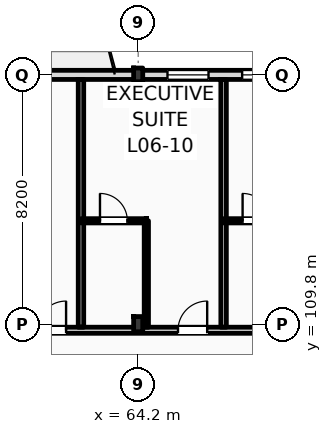
"""IFC4 building model, lengths in metres.
Left out: names, types, materials, properties, quantities, classifications, styles, units other than length and angle.
Written with IfcOpenShell. Run it as: python <this file> out.ifc"""

import sys

from ifc_helpers import new_model, si_unit, direction, frame, frame_2d, origin, origin_2d, place, context, subcontext, project, spatial, rectangle, i_section, extrude, element, fill, save


model = new_model("IFC4")
c1 = context("Model", 3, precision=1e-05, world=origin(), true_north=direction((0.0, 1.0)))
c2 = subcontext(c1, "Body", "Model", "MODEL_VIEW")
j1 = project(units=[si_unit("LENGTHUNIT", "METRE"), si_unit("PLANEANGLEUNIT", "RADIAN")], contexts=[c1])
p1 = place(None, origin())
s1 = spatial("IfcSite", under=j1, at=p1, CompositionType="ELEMENT")
p2 = place(p1, origin())
s2 = spatial("IfcBuilding", under=s1, at=p2, CompositionType="ELEMENT")
p3 = place(p2, frame((0.0, 0.0, 28.2)))
s3 = spatial("IfcBuildingStorey", under=s2, at=p3, CompositionType="ELEMENT", Elevation=28.2)
p4 = place(p3, frame((64.2, 109.8, 0.0), z_axis=(0.0, 0.0, 1.0), x_axis=(1.0, 0.0, 0.0)))
e1 = element("IfcColumn", 1, at=p4, inside=s3, PredefinedType="COLUMN", context=c2, shape_type="SweptSolid", body=[
    extrude(i_section(OverallWidth=0.3, OverallDepth=0.5, WebThickness=0.014, FlangeThickness=0.028, FilletRadius=0.027, at=origin_2d()), origin(), (0.0, 0.0, 1.0), 3.6),
])
p5 = place(p3, frame((64.2, 118.0, 0.0), z_axis=(0.0, 0.0, 1.0), x_axis=(1.0, 0.0, 0.0)))
e2 = element("IfcColumn", 2, at=p5, inside=s3, PredefinedType="COLUMN", context=c2, shape_type="SweptSolid", body=[
    extrude(i_section(OverallWidth=0.3, OverallDepth=0.45, WebThickness=0.014, FlangeThickness=0.026, FilletRadius=0.027, at=origin_2d()), origin(), (0.0, 0.0, 1.0), 3.6),
])
p6 = place(p3, frame((22.5, 118.0, 0.0), z_axis=(0.0, 0.0, 1.0), x_axis=(1.0, 0.0, 0.0)))
e3 = element("IfcWall", 3, at=p6, inside=s3, PredefinedType="STANDARD", context=c2, shape_type="SweptSolid", body=[
    extrude(rectangle(XDim=97.5, YDim=0.3, at=frame_2d((48.75, 0.0))), origin(), (0.0, 0.0, 1.0), 2.8),
])
p7 = place(p6, frame((0.91, 0.0, 0.9)))
e4 = element("IfcOpeningElement", 4, at=p7, cuts=e3, PredefinedType="OPENING", context=c2, shape_type="SweptSolid", body=[
    extrude(rectangle(XDim=0.9, YDim=1.72, at=frame_2d((0.45, 0.86))), frame((0.0, 0.16, 0.0), z_axis=(0.0, -1.0, 0.0), x_axis=(1.0, 0.0, 0.0)), (0.0, 0.0, 1.0), 0.32),
])
p8 = place(p6, frame((6.561, 0.0, 0.0)))
e5 = element("IfcOpeningElement", 5, at=p8, cuts=e3, PredefinedType="OPENING", context=c2, shape_type="SweptSolid", body=[
    extrude(rectangle(XDim=1.2, YDim=2.25, at=frame_2d((0.6, 1.125))), frame((0.0, 0.16, 0.0), z_axis=(0.0, -1.0, 0.0), x_axis=(1.0, 0.0, 0.0)), (0.0, 0.0, 1.0), 0.32),
])
p9 = place(p6, frame((11.477, 0.0, 0.9)))
e6 = element("IfcOpeningElement", 6, at=p9, cuts=e3, PredefinedType="OPENING", context=c2, shape_type="SweptSolid", body=[
    extrude(rectangle(XDim=1.1, YDim=1.5, at=frame_2d((0.55, 0.75))), frame((0.0, 0.16, 0.0), z_axis=(0.0, -1.0, 0.0), x_axis=(1.0, 0.0, 0.0)), (0.0, 0.0, 1.0), 0.32),
])
p10 = place(p6, frame((15.194, 0.0, 0.9)))
e7 = element("IfcOpeningElement", 7, at=p10, cuts=e3, PredefinedType="OPENING", context=c2, shape_type="SweptSolid", body=[
    extrude(rectangle(XDim=1.25, YDim=1.6, at=frame_2d((0.625, 0.8))), frame((0.0, 0.16, 0.0), z_axis=(0.0, -1.0, 0.0), x_axis=(1.0, 0.0, 0.0)), (0.0, 0.0, 1.0), 0.32),
])
p11 = place(p6, frame((19.509, 0.0, 0.9)))
e8 = element("IfcOpeningElement", 8, at=p11, cuts=e3, PredefinedType="OPENING", context=c2, shape_type="SweptSolid", body=[
    extrude(rectangle(XDim=1.4, YDim=1.7, at=frame_2d((0.7, 0.85))), frame((0.0, 0.16, 0.0), z_axis=(0.0, -1.0, 0.0), x_axis=(1.0, 0.0, 0.0)), (0.0, 0.0, 1.0), 0.32),
])
p12 = place(p6, frame((23.258, 0.0, 0.0)))
e9 = element("IfcOpeningElement", 9, at=p12, cuts=e3, PredefinedType="OPENING", context=c2, shape_type="SweptSolid", body=[
    extrude(rectangle(XDim=1.2, YDim=2.25, at=frame_2d((0.6, 1.125))), frame((0.0, 0.16, 0.0), z_axis=(0.0, -1.0, 0.0), x_axis=(1.0, 0.0, 0.0)), (0.0, 0.0, 1.0), 0.32),
])
p13 = place(p6, frame((28.115, 0.0, 0.9)))
e10 = element("IfcOpeningElement", 10, at=p13, cuts=e3, PredefinedType="OPENING", context=c2, shape_type="SweptSolid", body=[
    extrude(rectangle(XDim=1.75, YDim=1.72, at=frame_2d((0.875, 0.86))), frame((0.0, 0.16, 0.0), z_axis=(0.0, -1.0, 0.0), x_axis=(1.0, 0.0, 0.0)), (0.0, 0.0, 1.0), 0.32),
])
p14 = place(p6, frame((31.582, 0.0, 0.9)))
e11 = element("IfcOpeningElement", 11, at=p14, cuts=e3, PredefinedType="OPENING", context=c2, shape_type="SweptSolid", body=[
    extrude(rectangle(XDim=1.35, YDim=1.72, at=frame_2d((0.675, 0.86))), frame((0.0, 0.16, 0.0), z_axis=(0.0, -1.0, 0.0), x_axis=(1.0, 0.0, 0.0)), (0.0, 0.0, 1.0), 0.32),
])
p15 = place(p6, frame((37.379, 0.0, 0.0)))
e12 = element("IfcOpeningElement", 12, at=p15, cuts=e3, PredefinedType="OPENING", context=c2, shape_type="SweptSolid", body=[
    extrude(rectangle(XDim=1.2, YDim=2.25, at=frame_2d((0.6, 1.125))), frame((0.0, 0.16, 0.0), z_axis=(0.0, -1.0, 0.0), x_axis=(1.0, 0.0, 0.0)), (0.0, 0.0, 1.0), 0.32),
])
p16 = place(p6, frame((42.663, 0.0, 0.9)))
e13 = element("IfcOpeningElement", 13, at=p16, cuts=e3, PredefinedType="OPENING", context=c2, shape_type="SweptSolid", body=[
    extrude(rectangle(XDim=1.35, YDim=1.72, at=frame_2d((0.675, 0.86))), frame((0.0, 0.16, 0.0), z_axis=(0.0, -1.0, 0.0), x_axis=(1.0, 0.0, 0.0)), (0.0, 0.0, 1.0), 0.32),
])
p17 = place(p6, frame((45.119, 0.0, 0.9)))
e14 = element("IfcOpeningElement", 14, at=p17, cuts=e3, PredefinedType="OPENING", context=c2, shape_type="SweptSolid", body=[
    extrude(rectangle(XDim=2.871, YDim=1.72, at=frame_2d((1.436, 0.86))), frame((0.0, 0.16, 0.0), z_axis=(0.0, -1.0, 0.0), x_axis=(1.0, 0.0, 0.0)), (0.0, 0.0, 1.0), 0.32),
])
p18 = place(p6, frame((50.41, 0.0, 0.9)))
e15 = element("IfcOpeningElement", 15, at=p18, cuts=e3, PredefinedType="OPENING", context=c2, shape_type="SweptSolid", body=[
    extrude(rectangle(XDim=1.8, YDim=1.72, at=frame_2d((0.9, 0.86))), frame((0.0, 0.16, 0.0), z_axis=(0.0, -1.0, 0.0), x_axis=(1.0, 0.0, 0.0)), (0.0, 0.0, 1.0), 0.32),
])
p19 = place(p6, frame((54.375, 0.0, 0.0)))
e16 = element("IfcOpeningElement", 16, at=p19, cuts=e3, PredefinedType="OPENING", context=c2, shape_type="SweptSolid", body=[
    extrude(rectangle(XDim=1.2, YDim=2.25, at=frame_2d((0.6, 1.125))), frame((0.0, 0.16, 0.0), z_axis=(0.0, -1.0, 0.0), x_axis=(1.0, 0.0, 0.0)), (0.0, 0.0, 1.0), 0.32),
])
p20 = place(p6, frame((59.052, 0.0, 0.9)))
e17 = element("IfcOpeningElement", 17, at=p20, cuts=e3, PredefinedType="OPENING", context=c2, shape_type="SweptSolid", body=[
    extrude(rectangle(XDim=1.35, YDim=1.72, at=frame_2d((0.675, 0.86))), frame((0.0, 0.16, 0.0), z_axis=(0.0, -1.0, 0.0), x_axis=(1.0, 0.0, 0.0)), (0.0, 0.0, 1.0), 0.32),
])
p21 = place(p6, frame((62.768, 0.0, 0.9)))
e18 = element("IfcOpeningElement", 18, at=p21, cuts=e3, PredefinedType="OPENING", context=c2, shape_type="SweptSolid", body=[
    extrude(rectangle(XDim=1.5, YDim=1.72, at=frame_2d((0.75, 0.86))), frame((0.0, 0.16, 0.0), z_axis=(0.0, -1.0, 0.0), x_axis=(1.0, 0.0, 0.0)), (0.0, 0.0, 1.0), 0.32),
])
p22 = place(p6, frame((68.498, 0.0, 0.0)))
e19 = element("IfcOpeningElement", 19, at=p22, cuts=e3, PredefinedType="OPENING", context=c2, shape_type="SweptSolid", body=[
    extrude(rectangle(XDim=1.2, YDim=2.25, at=frame_2d((0.6, 1.125))), frame((0.0, 0.16, 0.0), z_axis=(0.0, -1.0, 0.0), x_axis=(1.0, 0.0, 0.0)), (0.0, 0.0, 1.0), 0.32),
])
p23 = place(p6, frame((71.265, 0.0, 0.9)))
e20 = element("IfcOpeningElement", 20, at=p23, cuts=e3, PredefinedType="OPENING", context=c2, shape_type="SweptSolid", body=[
    extrude(rectangle(XDim=0.9, YDim=1.72, at=frame_2d((0.45, 0.86))), frame((0.0, 0.16, 0.0), z_axis=(0.0, -1.0, 0.0), x_axis=(1.0, 0.0, 0.0)), (0.0, 0.0, 1.0), 0.32),
])
p24 = place(p6, frame((76.316, 0.0, 0.9)))
e21 = element("IfcOpeningElement", 21, at=p24, cuts=e3, PredefinedType="OPENING", context=c2, shape_type="SweptSolid", body=[
    extrude(rectangle(XDim=1.95, YDim=1.72, at=frame_2d((0.975, 0.86))), frame((0.0, 0.16, 0.0), z_axis=(0.0, -1.0, 0.0), x_axis=(1.0, 0.0, 0.0)), (0.0, 0.0, 1.0), 0.32),
])
p25 = place(p6, frame((81.632, 0.0, 0.9)))
e22 = element("IfcOpeningElement", 22, at=p25, cuts=e3, PredefinedType="OPENING", context=c2, shape_type="SweptSolid", body=[
    extrude(rectangle(XDim=1.35, YDim=1.72, at=frame_2d((0.675, 0.86))), frame((0.0, 0.16, 0.0), z_axis=(0.0, -1.0, 0.0), x_axis=(1.0, 0.0, 0.0)), (0.0, 0.0, 1.0), 0.32),
])
p26 = place(p6, frame((84.948, 0.0, 0.9)))
e23 = element("IfcOpeningElement", 23, at=p26, cuts=e3, PredefinedType="OPENING", context=c2, shape_type="SweptSolid", body=[
    extrude(rectangle(XDim=2.25, YDim=1.72, at=frame_2d((1.125, 0.86))), frame((0.0, 0.16, 0.0), z_axis=(0.0, -1.0, 0.0), x_axis=(1.0, 0.0, 0.0)), (0.0, 0.0, 1.0), 0.32),
])
p27 = place(p6, frame((90.063, 0.0, 0.9)))
e24 = element("IfcOpeningElement", 24, at=p27, cuts=e3, PredefinedType="OPENING", context=c2, shape_type="SweptSolid", body=[
    extrude(rectangle(XDim=1.8, YDim=1.72, at=frame_2d((0.9, 0.86))), frame((0.0, 0.16, 0.0), z_axis=(0.0, -1.0, 0.0), x_axis=(1.0, 0.0, 0.0)), (0.0, 0.0, 1.0), 0.32),
])
p28 = place(p6, frame((93.529, 0.0, 0.9)))
e25 = element("IfcOpeningElement", 25, at=p28, cuts=e3, PredefinedType="OPENING", context=c2, shape_type="SweptSolid", body=[
    extrude(rectangle(XDim=2.55, YDim=1.72, at=frame_2d((1.275, 0.86))), frame((0.0, 0.16, 0.0), z_axis=(0.0, -1.0, 0.0), x_axis=(1.0, 0.0, 0.0)), (0.0, 0.0, 1.0), 0.32),
])
p29 = place(p3, frame((10.65, 109.6, 0.0), z_axis=(0.0, 0.0, 1.0), x_axis=(1.0, 0.0, 0.0)))
e26 = element("IfcWall", 26, at=p29, inside=s3, PredefinedType="PARTITIONING", context=c2, shape_type="SweptSolid", body=[
    extrude(rectangle(XDim=109.21, YDim=0.2, at=frame_2d((54.605, 0.0))), origin(), (0.0, 0.0, 1.0), 2.8),
])
p30 = place(p29, frame((12.611, 0.0, 0.0)))
e27 = element("IfcOpeningElement", 27, at=p30, cuts=e26, PredefinedType="OPENING", context=c2, shape_type="SweptSolid", body=[
    extrude(rectangle(XDim=1.02, YDim=2.2, at=frame_2d((0.51, 1.1))), frame((0.0, 0.11, 0.0), z_axis=(0.0, -1.0, 0.0), x_axis=(1.0, 0.0, 0.0)), (0.0, 0.0, 1.0), 0.22),
])
p31 = place(p29, frame((19.451, 0.0, 0.0)))
e28 = element("IfcOpeningElement", 28, at=p31, cuts=e26, PredefinedType="OPENING", context=c2, shape_type="SweptSolid", body=[
    extrude(rectangle(XDim=1.02, YDim=2.2, at=frame_2d((0.51, 1.1))), frame((0.0, 0.11, 0.0), z_axis=(0.0, -1.0, 0.0), x_axis=(1.0, 0.0, 0.0)), (0.0, 0.0, 1.0), 0.22),
])
p32 = place(p29, frame((23.842, 0.0, 0.0)))
e29 = element("IfcOpeningElement", 29, at=p32, cuts=e26, PredefinedType="OPENING", context=c2, shape_type="SweptSolid", body=[
    extrude(rectangle(XDim=1.02, YDim=2.2, at=frame_2d((0.51, 1.1))), frame((0.0, 0.11, 0.0), z_axis=(0.0, -1.0, 0.0), x_axis=(1.0, 0.0, 0.0)), (0.0, 0.0, 1.0), 0.22),
])
p33 = place(p29, frame((26.084, 0.0, 0.0)))
e30 = element("IfcOpeningElement", 30, at=p33, cuts=e26, PredefinedType="OPENING", context=c2, shape_type="SweptSolid", body=[
    extrude(rectangle(XDim=1.02, YDim=2.2, at=frame_2d((0.51, 1.1))), frame((0.0, 0.11, 0.0), z_axis=(0.0, -1.0, 0.0), x_axis=(1.0, 0.0, 0.0)), (0.0, 0.0, 1.0), 0.22),
])
p34 = place(p29, frame((32.655, 0.0, 0.0)))
e31 = element("IfcOpeningElement", 31, at=p34, cuts=e26, PredefinedType="OPENING", context=c2, shape_type="SweptSolid", body=[
    extrude(rectangle(XDim=0.96, YDim=2.2, at=frame_2d((0.48, 1.1))), frame((0.0, 0.11, 0.0), z_axis=(0.0, -1.0, 0.0), x_axis=(1.0, 0.0, 0.0)), (0.0, 0.0, 1.0), 0.22),
])
p35 = place(p29, frame((34.895, 0.0, 0.0)))
e32 = element("IfcOpeningElement", 32, at=p35, cuts=e26, PredefinedType="OPENING", context=c2, shape_type="SweptSolid", body=[
    extrude(rectangle(XDim=0.96, YDim=2.2, at=frame_2d((0.48, 1.1))), frame((0.0, 0.11, 0.0), z_axis=(0.0, -1.0, 0.0), x_axis=(1.0, 0.0, 0.0)), (0.0, 0.0, 1.0), 0.22),
])
p36 = place(p29, frame((41.436, 0.0, 0.0)))
e33 = element("IfcOpeningElement", 33, at=p36, cuts=e26, PredefinedType="OPENING", context=c2, shape_type="SweptSolid", body=[
    extrude(rectangle(XDim=0.96, YDim=2.2, at=frame_2d((0.48, 1.1))), frame((0.0, 0.11, 0.0), z_axis=(0.0, -1.0, 0.0), x_axis=(1.0, 0.0, 0.0)), (0.0, 0.0, 1.0), 0.22),
])
p37 = place(p29, frame((43.427, 0.0, 0.0)))
e34 = element("IfcOpeningElement", 34, at=p37, cuts=e26, PredefinedType="OPENING", context=c2, shape_type="SweptSolid", body=[
    extrude(rectangle(XDim=0.96, YDim=2.2, at=frame_2d((0.48, 1.1))), frame((0.0, 0.11, 0.0), z_axis=(0.0, -1.0, 0.0), x_axis=(1.0, 0.0, 0.0)), (0.0, 0.0, 1.0), 0.22),
])
p38 = place(p29, frame((50.218, 0.0, 0.0)))
e35 = element("IfcOpeningElement", 35, at=p38, cuts=e26, PredefinedType="OPENING", context=c2, shape_type="SweptSolid", body=[
    extrude(rectangle(XDim=0.96, YDim=2.2, at=frame_2d((0.48, 1.1))), frame((0.0, 0.11, 0.0), z_axis=(0.0, -1.0, 0.0), x_axis=(1.0, 0.0, 0.0)), (0.0, 0.0, 1.0), 0.22),
])
p39 = place(p29, frame((54.859, 0.0, 0.0)))
e36 = element("IfcOpeningElement", 36, at=p39, cuts=e26, PredefinedType="OPENING", context=c2, shape_type="SweptSolid", body=[
    extrude(rectangle(XDim=0.96, YDim=2.2, at=frame_2d((0.48, 1.1))), frame((0.0, 0.11, 0.0), z_axis=(0.0, -1.0, 0.0), x_axis=(1.0, 0.0, 0.0)), (0.0, 0.0, 1.0), 0.22),
])
p40 = place(p29, frame((59.0, 0.0, 0.0)))
e37 = element("IfcOpeningElement", 37, at=p40, cuts=e26, PredefinedType="OPENING", context=c2, shape_type="SweptSolid", body=[
    extrude(rectangle(XDim=0.96, YDim=2.2, at=frame_2d((0.48, 1.1))), frame((0.0, 0.11, 0.0), z_axis=(0.0, -1.0, 0.0), x_axis=(1.0, 0.0, 0.0)), (0.0, 0.0, 1.0), 0.22),
])
p41 = place(p29, frame((63.39, 0.0, 0.0)))
e38 = element("IfcOpeningElement", 38, at=p41, cuts=e26, PredefinedType="OPENING", context=c2, shape_type="SweptSolid", body=[
    extrude(rectangle(XDim=0.96, YDim=2.2, at=frame_2d((0.48, 1.1))), frame((0.0, 0.11, 0.0), z_axis=(0.0, -1.0, 0.0), x_axis=(1.0, 0.0, 0.0)), (0.0, 0.0, 1.0), 0.22),
])
p42 = place(p29, frame((65.631, 0.0, 0.0)))
e39 = element("IfcOpeningElement", 39, at=p42, cuts=e26, PredefinedType="OPENING", context=c2, shape_type="SweptSolid", body=[
    extrude(rectangle(XDim=0.96, YDim=2.2, at=frame_2d((0.48, 1.1))), frame((0.0, 0.11, 0.0), z_axis=(0.0, -1.0, 0.0), x_axis=(1.0, 0.0, 0.0)), (0.0, 0.0, 1.0), 0.22),
])
p43 = place(p29, frame((72.172, 0.0, 0.0)))
e40 = element("IfcOpeningElement", 40, at=p43, cuts=e26, PredefinedType="OPENING", context=c2, shape_type="SweptSolid", body=[
    extrude(rectangle(XDim=0.96, YDim=2.2, at=frame_2d((0.48, 1.1))), frame((0.0, 0.11, 0.0), z_axis=(0.0, -1.0, 0.0), x_axis=(1.0, 0.0, 0.0)), (0.0, 0.0, 1.0), 0.22),
])
p44 = place(p29, frame((74.413, 0.0, 0.0)))
e41 = element("IfcOpeningElement", 41, at=p44, cuts=e26, PredefinedType="OPENING", context=c2, shape_type="SweptSolid", body=[
    extrude(rectangle(XDim=0.96, YDim=2.2, at=frame_2d((0.48, 1.1))), frame((0.0, 0.11, 0.0), z_axis=(0.0, -1.0, 0.0), x_axis=(1.0, 0.0, 0.0)), (0.0, 0.0, 1.0), 0.22),
])
p45 = place(p29, frame((80.954, 0.0, 0.0)))
e42 = element("IfcOpeningElement", 42, at=p45, cuts=e26, PredefinedType="OPENING", context=c2, shape_type="SweptSolid", body=[
    extrude(rectangle(XDim=0.96, YDim=2.2, at=frame_2d((0.48, 1.1))), frame((0.0, 0.11, 0.0), z_axis=(0.0, -1.0, 0.0), x_axis=(1.0, 0.0, 0.0)), (0.0, 0.0, 1.0), 0.22),
])
p46 = place(p29, frame((83.195, 0.0, 0.0)))
e43 = element("IfcOpeningElement", 43, at=p46, cuts=e26, PredefinedType="OPENING", context=c2, shape_type="SweptSolid", body=[
    extrude(rectangle(XDim=0.96, YDim=2.2, at=frame_2d((0.48, 1.1))), frame((0.0, 0.11, 0.0), z_axis=(0.0, -1.0, 0.0), x_axis=(1.0, 0.0, 0.0)), (0.0, 0.0, 1.0), 0.22),
])
p47 = place(p29, frame((89.735, 0.0, 0.0)))
e44 = element("IfcOpeningElement", 44, at=p47, cuts=e26, PredefinedType="OPENING", context=c2, shape_type="SweptSolid", body=[
    extrude(rectangle(XDim=0.96, YDim=2.2, at=frame_2d((0.48, 1.1))), frame((0.0, 0.11, 0.0), z_axis=(0.0, -1.0, 0.0), x_axis=(1.0, 0.0, 0.0)), (0.0, 0.0, 1.0), 0.22),
])
p48 = place(p29, frame((94.126, 0.0, 0.0)))
e45 = element("IfcOpeningElement", 45, at=p48, cuts=e26, PredefinedType="OPENING", context=c2, shape_type="SweptSolid", body=[
    extrude(rectangle(XDim=0.96, YDim=2.2, at=frame_2d((0.48, 1.1))), frame((0.0, 0.11, 0.0), z_axis=(0.0, -1.0, 0.0), x_axis=(1.0, 0.0, 0.0)), (0.0, 0.0, 1.0), 0.22),
])
p49 = place(p29, frame((98.517, 0.0, 0.0)))
e46 = element("IfcOpeningElement", 46, at=p49, cuts=e26, PredefinedType="OPENING", context=c2, shape_type="SweptSolid", body=[
    extrude(rectangle(XDim=0.96, YDim=2.2, at=frame_2d((0.48, 1.1))), frame((0.0, 0.11, 0.0), z_axis=(0.0, -1.0, 0.0), x_axis=(1.0, 0.0, 0.0)), (0.0, 0.0, 1.0), 0.22),
])
p50 = place(p29, frame((102.908, 0.0, 0.0)))
e47 = element("IfcOpeningElement", 47, at=p50, cuts=e26, PredefinedType="OPENING", context=c2, shape_type="SweptSolid", body=[
    extrude(rectangle(XDim=0.96, YDim=2.2, at=frame_2d((0.48, 1.1))), frame((0.0, 0.11, 0.0), z_axis=(0.0, -1.0, 0.0), x_axis=(1.0, 0.0, 0.0)), (0.0, 0.0, 1.0), 0.22),
])
p51 = place(p29, frame((105.099, 0.0, 0.0)))
e48 = element("IfcOpeningElement", 48, at=p51, cuts=e26, PredefinedType="OPENING", context=c2, shape_type="SweptSolid", body=[
    extrude(rectangle(XDim=0.96, YDim=2.2, at=frame_2d((0.48, 1.1))), frame((0.0, 0.11, 0.0), z_axis=(0.0, -1.0, 0.0), x_axis=(1.0, 0.0, 0.0)), (0.0, 0.0, 1.0), 0.22),
])
p52 = place(p29, frame((2.716, 0.0, 0.0)))
e49 = element("IfcOpeningElement", 49, at=p52, cuts=e26, PredefinedType="OPENING", context=c2, shape_type="SweptSolid", body=[
    extrude(rectangle(XDim=1.35, YDim=2.25, at=frame_2d((0.675, 1.125))), frame((0.0, 0.11, 0.0), z_axis=(0.0, -1.0, 0.0), x_axis=(1.0, 0.0, 0.0)), (0.0, 0.0, 1.0), 0.22),
])
p53 = place(p29, frame((6.65, 0.0, 0.0)))
e50 = element("IfcOpeningElement", 50, at=p53, cuts=e26, PredefinedType="OPENING", context=c2, shape_type="SweptSolid", body=[
    extrude(rectangle(XDim=1.35, YDim=2.25, at=frame_2d((0.675, 1.125))), frame((0.0, 0.11, 0.0), z_axis=(0.0, -1.0, 0.0), x_axis=(1.0, 0.0, 0.0)), (0.0, 0.0, 1.0), 0.22),
])
p54 = place(p29, frame((10.583, 0.0, 0.0)))
e51 = element("IfcOpeningElement", 51, at=p54, cuts=e26, PredefinedType="OPENING", context=c2, shape_type="SweptSolid", body=[
    extrude(rectangle(XDim=1.35, YDim=2.25, at=frame_2d((0.675, 1.125))), frame((0.0, 0.11, 0.0), z_axis=(0.0, -1.0, 0.0), x_axis=(1.0, 0.0, 0.0)), (0.0, 0.0, 1.0), 0.22),
])
p55 = place(p3, frame((62.318, 109.7, 0.0), z_axis=(0.0, 0.0, 1.0), x_axis=(0.0, 1.0, 0.0)))
e52 = element("IfcWall", 52, at=p55, inside=s3, PredefinedType="PARTITIONING", context=c2, shape_type="SweptSolid", body=[
    extrude(rectangle(XDim=8.15, YDim=0.18, at=frame_2d((4.075, 0.0))), origin(), (0.0, 0.0, 1.0), 3.36),
])
p56 = place(p3, frame((67.009, 109.7, 0.0), z_axis=(0.0, 0.0, 1.0), x_axis=(0.0, 1.0, 0.0)))
e53 = element("IfcWall", 53, at=p56, inside=s3, PredefinedType="PARTITIONING", context=c2, shape_type="SweptSolid", body=[
    extrude(rectangle(XDim=8.15, YDim=0.18, at=frame_2d((4.075, 0.0))), origin(), (0.0, 0.0, 1.0), 3.05),
])
p57 = place(p3, frame((64.468, 109.7, 0.0), z_axis=(0.0, 0.0, 1.0), x_axis=(0.0, 1.0, 0.0)))
e54 = element("IfcWall", 54, at=p57, inside=s3, PredefinedType="PARTITIONING", context=c2, shape_type="SweptSolid", body=[
    extrude(rectangle(XDim=3.5, YDim=0.14, at=frame_2d((1.75, 0.0))), origin(), (0.0, 0.0, 1.0), 3.36),
])
p58 = place(p3, frame((62.318, 113.2, 0.0), z_axis=(0.0, 0.0, 1.0), x_axis=(1.0, 0.0, 0.0)))
e55 = element("IfcWall", 55, at=p58, inside=s3, PredefinedType="PARTITIONING", context=c2, shape_type="SweptSolid", body=[
    extrude(rectangle(XDim=2.15, YDim=0.14, at=frame_2d((1.075, 0.0))), origin(), (0.0, 0.0, 1.0), 3.36),
])
p59 = place(p58, frame((0.625, 0.0, 0.0)))
e56 = element("IfcOpeningElement", 56, at=p59, cuts=e55, PredefinedType="OPENING", context=c2, shape_type="SweptSolid", body=[
    extrude(rectangle(XDim=0.9, YDim=2.1, at=frame_2d((0.45, 1.05))), frame((0.0, 0.08, 0.0), z_axis=(0.0, -1.0, 0.0), x_axis=(1.0, 0.0, 0.0)), (0.0, 0.0, 1.0), 0.16),
])
p60 = place(p3, frame((67.009, 113.2, 0.0), z_axis=(0.0, 0.0, 1.0), x_axis=(1.0, 0.0, 0.0)))
e57 = element("IfcWall", 57, at=p60, inside=s3, PredefinedType="PARTITIONING", context=c2, shape_type="SweptSolid", body=[
    extrude(rectangle(XDim=2.15, YDim=0.14, at=frame_2d((1.075, 0.0))), origin(), (0.0, 0.0, 1.0), 3.36),
])
p61 = place(p60, frame((0.625, 0.0, 0.0)))
e58 = element("IfcOpeningElement", 58, at=p61, cuts=e57, PredefinedType="OPENING", context=c2, shape_type="SweptSolid", body=[
    extrude(rectangle(XDim=0.9, YDim=2.1, at=frame_2d((0.45, 1.05))), frame((0.0, 0.08, 0.0), z_axis=(0.0, -1.0, 0.0), x_axis=(1.0, 0.0, 0.0)), (0.0, 0.0, 1.0), 0.16),
])
p62 = place(p16, origin())
e59 = element("IfcWindow", 59, at=p62, inside=s3, PartitioningType="DOUBLE_PANEL_VERTICAL", PredefinedType="WINDOW", context=c2, shape_type="SweptSolid", body=[
    extrude(rectangle(XDim=1.35, YDim=1.72, at=frame_2d((0.675, 0.86))), frame((0.0, 0.03, 0.0), z_axis=(0.0, -1.0, 0.0), x_axis=(1.0, 0.0, 0.0)), (0.0, 0.0, 1.0), 0.06),
])
fill(e13, e59)
p63 = place(p17, origin())
e60 = element("IfcWindow", 60, at=p63, inside=s3, PartitioningType="DOUBLE_PANEL_VERTICAL", PredefinedType="WINDOW", context=c2, shape_type="SweptSolid", body=[
    extrude(rectangle(XDim=2.871, YDim=1.72, at=frame_2d((1.436, 0.86))), frame((0.0, 0.03, 0.0), z_axis=(0.0, -1.0, 0.0), x_axis=(1.0, 0.0, 0.0)), (0.0, 0.0, 1.0), 0.06),
])
fill(e14, e60)
p64 = place(p38, origin())
e61 = element("IfcDoor", 61, at=p64, inside=s3, OperationType="SINGLE_SWING_RIGHT", PredefinedType="DOOR", context=c2, shape_type="SweptSolid", body=[
    extrude(rectangle(XDim=0.96, YDim=2.2, at=frame_2d((0.48, 1.1))), frame((0.0, 0.025, 0.0), z_axis=(0.0, -1.0, 0.0), x_axis=(1.0, 0.0, 0.0)), (0.0, 0.0, 1.0), 0.05),
])
fill(e35, e61)
p65 = place(p39, origin())
e62 = element("IfcDoor", 62, at=p65, inside=s3, OperationType="SINGLE_SWING_RIGHT", PredefinedType="DOOR", context=c2, shape_type="SweptSolid", body=[
    extrude(rectangle(XDim=0.96, YDim=2.2, at=frame_2d((0.48, 1.1))), frame((0.0, 0.025, 0.0), z_axis=(0.0, -1.0, 0.0), x_axis=(1.0, 0.0, 0.0)), (0.0, 0.0, 1.0), 0.05),
])
fill(e36, e62)
p66 = place(p59, origin())
e63 = element("IfcDoor", 63, at=p66, inside=s3, OperationType="SINGLE_SWING_LEFT", PredefinedType="DOOR", context=c2, shape_type="SweptSolid", body=[
    extrude(rectangle(XDim=0.9, YDim=2.1, at=frame_2d((0.45, 1.05))), frame((0.0, 0.025, 0.0), z_axis=(0.0, -1.0, 0.0), x_axis=(1.0, 0.0, 0.0)), (0.0, 0.0, 1.0), 0.05),
])
fill(e56, e63)
p67 = place(p61, origin())
e64 = element("IfcDoor", 64, at=p67, inside=s3, OperationType="SINGLE_SWING_LEFT", PredefinedType="DOOR", context=c2, shape_type="SweptSolid", body=[
    extrude(rectangle(XDim=0.9, YDim=2.1, at=frame_2d((0.45, 1.05))), frame((0.0, 0.025, 0.0), z_axis=(0.0, -1.0, 0.0), x_axis=(1.0, 0.0, 0.0)), (0.0, 0.0, 1.0), 0.05),
])
fill(e58, e64)
save(model, sys.argv[1])
